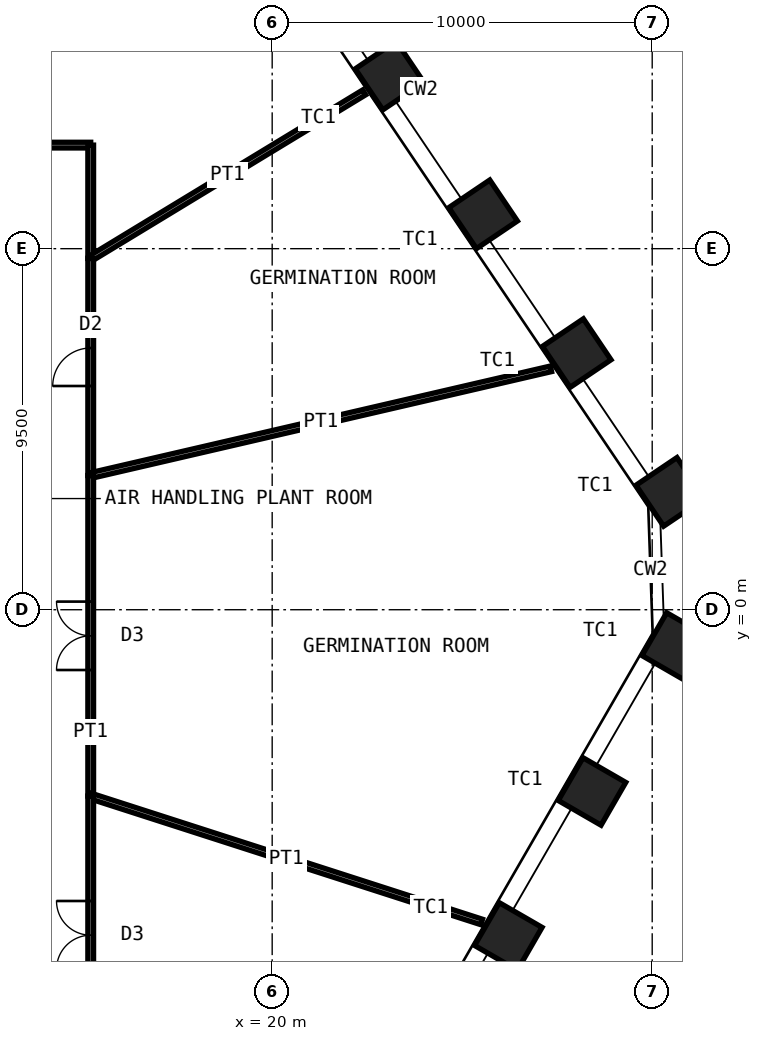
"""IFC4 building model, lengths in metres.
Left out: names, types, materials, properties, quantities, classifications, styles, units other than length and angle.
Written with IfcOpenShell. Run it as: python <this file> out.ifc"""

import sys

from ifc_helpers import new_model, si_unit, direction, frame, frame_2d, origin, origin_2d, place, context, subcontext, project, spatial, rectangle, hollow_rectangle, extrude, element, fill, save


model = new_model("IFC4")
c1 = context("Model", 3, precision=1e-05, world=origin(), true_north=direction((0.0, 1.0)))
c2 = subcontext(c1, "Body", "Model", "MODEL_VIEW")
j1 = project(units=[si_unit("LENGTHUNIT", "METRE"), si_unit("PLANEANGLEUNIT", "RADIAN")], contexts=[c1])
p1 = place(None, origin())
s1 = spatial("IfcSite", under=j1, at=p1, CompositionType="ELEMENT")
p2 = place(p1, origin())
s2 = spatial("IfcBuilding", under=s1, at=p2, CompositionType="ELEMENT")
p3 = place(p2, frame((0.0, 0.0, 27.0)))
s3 = spatial("IfcBuildingStorey", under=s2, at=p3, CompositionType="ELEMENT", Elevation=27.0)
for number, where, z_axis, x_axis in (
    (1, (23.087, 14.056, 0.0), (0.0, 0.0, 1.0), (-0.559, 0.829, 0.0)),
    (2, (25.55, 10.404, 0.0), (0.0, 0.0, 1.0), (-0.559, 0.829, 0.0)),
    (3, (28.013, 6.752, 0.0), (0.0, 0.0, 1.0), (-0.559, 0.829, 0.0)),
    (4, (30.476, 3.101, 0.0), (0.0, 0.0, 1.0), (-0.559, 0.829, 0.0)),
    (5, (30.618, -0.967, 0.0), (0.0, 0.0, 1.0), (0.5, 0.866, 0.0)),
    (6, (28.416, -4.782, 0.0), (0.0, 0.0, 1.0), (0.5, 0.866, 0.0)),
    (7, (26.214, -8.596, 0.0), (0.0, 0.0, 1.0), (0.5, 0.866, 0.0)),
):
    element("IfcColumn", number, at=place(p3, frame(where, z_axis=z_axis, x_axis=x_axis)), inside=s3, PredefinedType="COLUMN", context=c2, shape_type="SweptSolid", body=[
        extrude(hollow_rectangle(XDim=1.3, YDim=1.3, WallThickness=0.1, at=origin_2d()), origin(), (0.0, 0.0, 1.0), 5.0),
    ])
p4 = place(p3, frame((3.51, 12.225, 0.0), z_axis=(0.0, 0.0, 1.0), x_axis=(1.0, 0.0, 0.0)))
e8 = element("IfcWall", 8, at=p4, inside=s3, PredefinedType="PARTITIONING", context=c2, shape_type="SweptSolid", body=[
    extrude(rectangle(XDim=11.715, YDim=0.15, at=frame_2d((5.857, 0.0))), origin(), (0.0, 0.0, 1.0), 4.8),
])
p5 = place(p4, frame((4.958, 0.0, 0.0)))
e9 = element("IfcOpeningElement", 9, at=p5, cuts=e8, PredefinedType="OPENING", context=c2, shape_type="SweptSolid", body=[
    extrude(rectangle(XDim=1.8, YDim=2.4, at=frame_2d((0.9, 1.2))), frame((0.0, 0.085, 0.0), z_axis=(0.0, -1.0, 0.0), x_axis=(1.0, 0.0, 0.0)), (0.0, 0.0, 1.0), 0.17),
])
p6 = place(p3, frame((15.225, 12.225, 0.0), z_axis=(0.0, 0.0, 1.0), x_axis=(0.0, -1.0, 0.0)))
e10 = element("IfcWall", 10, at=p6, inside=s3, PredefinedType="PARTITIONING", context=c2, shape_type="SweptSolid", body=[
    extrude(rectangle(XDim=2.982, YDim=0.15, at=frame_2d((1.491, 0.0))), origin(), (0.0, 0.0, 1.0), 4.8),
])
p7 = place(p3, frame((22.421, 13.612, 0.0), z_axis=(0.0, 0.0, 1.0), x_axis=(-0.854789353023, -0.518975107263, 0.0)))
e11 = element("IfcWall", 11, at=p7, inside=s3, PredefinedType="PARTITIONING", context=c2, shape_type="SweptSolid", body=[
    extrude(rectangle(XDim=8.419, YDim=0.15, at=frame_2d((4.209, 0.0))), origin(), (0.0, 0.0, 1.0), 3.7),
])
p8 = place(p3, frame((15.225, 9.243, 0.0), z_axis=(0.0, 0.0, 1.0), x_axis=(0.0, -1.0, 0.0)))
e12 = element("IfcWall", 12, at=p8, inside=s3, PredefinedType="PARTITIONING", context=c2, shape_type="SweptSolid", body=[
    extrude(rectangle(XDim=5.713, YDim=0.15, at=frame_2d((2.856, 0.0))), origin(), (0.0, 0.0, 1.0), 4.8),
])
p9 = place(p8, frame((2.356, 0.0, 0.0)))
e13 = element("IfcOpeningElement", 13, at=p9, cuts=e12, PredefinedType="OPENING", context=c2, shape_type="SweptSolid", body=[
    extrude(rectangle(XDim=1.0, YDim=2.4, at=frame_2d((0.5, 1.2))), frame((0.0, 0.085, 0.0), z_axis=(0.0, -1.0, 0.0), x_axis=(1.0, 0.0, 0.0)), (0.0, 0.0, 1.0), 0.17),
])
p10 = place(p3, frame((27.336, 6.338, 0.0), z_axis=(0.0, 0.0, 1.0), x_axis=(-0.974155334075, -0.225879138243, 0.0)))
e14 = element("IfcWall", 14, at=p10, inside=s3, PredefinedType="PARTITIONING", context=c2, shape_type="SweptSolid", body=[
    extrude(rectangle(XDim=12.432, YDim=0.15, at=frame_2d((6.216, 0.0))), origin(), (0.0, 0.0, 1.0), 3.7),
])
p11 = place(p3, frame((15.225, 3.53, 0.0), z_axis=(0.0, 0.0, 1.0), x_axis=(0.0, -1.0, 0.0)))
e15 = element("IfcWall", 15, at=p11, inside=s3, PredefinedType="PARTITIONING", context=c2, shape_type="SweptSolid", body=[
    extrude(rectangle(XDim=8.433, YDim=0.15, at=frame_2d((4.217, 0.0))), origin(), (0.0, 0.0, 1.0), 4.8),
])
p12 = place(p11, frame((3.317, 0.0, 0.0)))
e16 = element("IfcOpeningElement", 16, at=p12, cuts=e15, PredefinedType="OPENING", context=c2, shape_type="SweptSolid", body=[
    extrude(rectangle(XDim=1.8, YDim=2.4, at=frame_2d((0.9, 1.2))), frame((0.0, 0.085, 0.0), z_axis=(0.0, -1.0, 0.0), x_axis=(1.0, 0.0, 0.0)), (0.0, 0.0, 1.0), 0.17),
])
p13 = place(p3, frame((25.512, -8.216, 0.0), z_axis=(0.0, 0.0, 1.0), x_axis=(-0.95186413264, 0.306520265225, 0.0)))
e17 = element("IfcWall", 17, at=p13, inside=s3, PredefinedType="PARTITIONING", context=c2, shape_type="SweptSolid", body=[
    extrude(rectangle(XDim=10.808, YDim=0.15, at=frame_2d((5.404, 0.0))), origin(), (0.0, 0.0, 1.0), 3.7),
])
p14 = place(p3, frame((15.225, -4.903, 0.0), z_axis=(0.0, 0.0, 1.0), x_axis=(0.0, -1.0, 0.0)))
e18 = element("IfcWall", 18, at=p14, inside=s3, PredefinedType="PARTITIONING", context=c2, shape_type="SweptSolid", body=[
    extrude(rectangle(XDim=7.322, YDim=0.15, at=frame_2d((3.661, 0.0))), origin(), (0.0, 0.0, 1.0), 4.8),
])
p15 = place(p14, frame((2.761, 0.0, 0.0)))
e19 = element("IfcOpeningElement", 19, at=p15, cuts=e18, PredefinedType="OPENING", context=c2, shape_type="SweptSolid", body=[
    extrude(rectangle(XDim=1.8, YDim=2.4, at=frame_2d((0.9, 1.2))), frame((0.0, 0.085, 0.0), z_axis=(0.0, -1.0, 0.0), x_axis=(1.0, 0.0, 0.0)), (0.0, 0.0, 1.0), 0.17),
])
p16 = place(p9, origin())
e20 = element("IfcDoor", 20, at=p16, inside=s3, OperationType="SINGLE_SWING_RIGHT", PredefinedType="DOOR", context=c2, shape_type="SweptSolid", body=[
    extrude(rectangle(XDim=1.0, YDim=2.4, at=frame_2d((0.5, 1.2))), frame((0.0, 0.025, 0.0), z_axis=(0.0, -1.0, 0.0), x_axis=(1.0, 0.0, 0.0)), (0.0, 0.0, 1.0), 0.05),
])
fill(e13, e20)
p17 = place(p12, origin())
e21 = element("IfcDoor", 21, at=p17, inside=s3, OperationType="DOUBLE_DOOR_DOUBLE_SWING", PredefinedType="DOOR", context=c2, shape_type="SweptSolid", body=[
    extrude(rectangle(XDim=1.8, YDim=2.4, at=frame_2d((0.9, 1.2))), frame((0.0, 0.025, 0.0), z_axis=(0.0, -1.0, 0.0), x_axis=(1.0, 0.0, 0.0)), (0.0, 0.0, 1.0), 0.05),
])
fill(e16, e21)
p18 = place(p15, origin())
e22 = element("IfcDoor", 22, at=p18, inside=s3, OperationType="DOUBLE_DOOR_DOUBLE_SWING", PredefinedType="DOOR", context=c2, shape_type="SweptSolid", body=[
    extrude(rectangle(XDim=1.8, YDim=2.4, at=frame_2d((0.9, 1.2))), frame((0.0, 0.025, 0.0), z_axis=(0.0, -1.0, 0.0), x_axis=(1.0, 0.0, 0.0)), (0.0, 0.0, 1.0), 0.05),
])
fill(e19, e22)
save(model, sys.argv[1])
